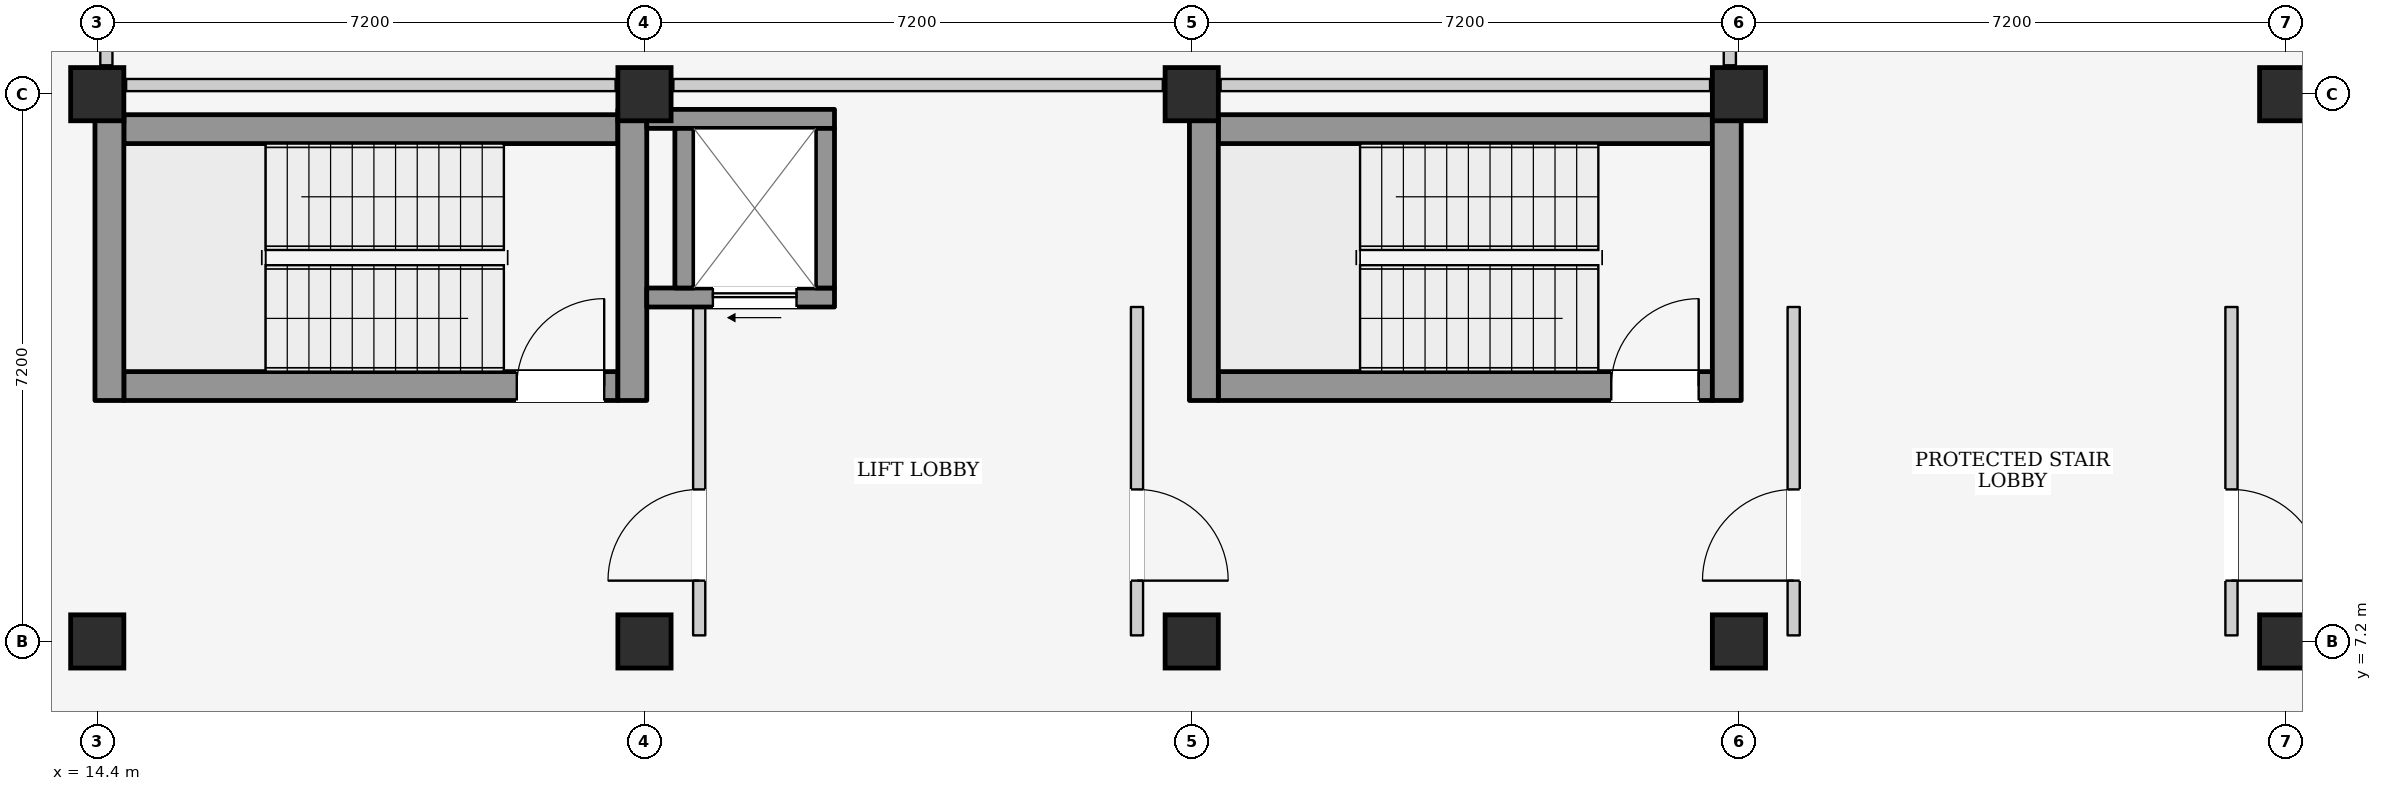
"""IFC4 building model, lengths in metres.
Left out: names, types, materials, properties, quantities, classifications, styles, units other than length and angle.
Written with IfcOpenShell. Run it as: python <this file> out.ifc"""

import sys

from ifc_helpers import new_model, si_unit, direction, frame, frame_2d, origin, origin_2d, place, context, subcontext, project, spatial, rectangle, extrude, element, fill, save


model = new_model("IFC4")
c1 = context("Model", 3, precision=1e-05, world=origin(), true_north=direction((0.0, 1.0)))
c2 = subcontext(c1, "Body", "Model", "MODEL_VIEW")
j1 = project(units=[si_unit("LENGTHUNIT", "METRE"), si_unit("PLANEANGLEUNIT", "RADIAN")], contexts=[c1])
p1 = place(None, origin())
s1 = spatial("IfcSite", under=j1, at=p1, CompositionType="ELEMENT")
p2 = place(p1, origin())
s2 = spatial("IfcBuilding", under=s1, at=p2, CompositionType="ELEMENT")
p3 = place(p2, frame((0.0, 0.0, -4.2)))
s3 = spatial("IfcBuildingStorey", under=s2, at=p3, CompositionType="ELEMENT", Elevation=-4.2)
for number, where, z_axis, x_axis in (
    (1, (14.4, 7.2, 0.0), (0.0, 0.0, 1.0), (1.0, 0.0, 0.0)),
    (2, (14.4, 14.4, 0.0), (0.0, 0.0, 1.0), (1.0, 0.0, 0.0)),
    (3, (21.6, 7.2, 0.0), (0.0, 0.0, 1.0), (1.0, 0.0, 0.0)),
    (4, (21.6, 14.4, 0.0), (0.0, 0.0, 1.0), (1.0, 0.0, 0.0)),
    (5, (28.8, 7.2, 0.0), (0.0, 0.0, 1.0), (1.0, 0.0, 0.0)),
    (6, (28.8, 14.4, 0.0), (0.0, 0.0, 1.0), (1.0, 0.0, 0.0)),
    (7, (36.0, 7.2, 0.0), (0.0, 0.0, 1.0), (1.0, 0.0, 0.0)),
    (8, (36.0, 14.4, 0.0), (0.0, 0.0, 1.0), (1.0, 0.0, 0.0)),
    (9, (43.2, 7.2, 0.0), (0.0, 0.0, 1.0), (1.0, 0.0, 0.0)),
    (10, (43.2, 14.4, 0.0), (0.0, 0.0, 1.0), (1.0, 0.0, 0.0)),
):
    element("IfcColumn", number, at=place(p3, frame(where, z_axis=z_axis, x_axis=x_axis)), inside=s3, PredefinedType="COLUMN", context=c2, shape_type="SweptSolid", body=[
        extrude(rectangle(XDim=0.7, YDim=0.7, at=origin_2d()), origin(), (0.0, 0.0, 1.0), 4.2),
    ])
p4 = place(p3, frame((14.75, 10.56, 0.0), z_axis=(0.0, 0.0, 1.0), x_axis=(1.0, 0.0, 0.0)))
e11 = element("IfcWall", 11, at=p4, inside=s3, PredefinedType="SHEAR", context=c2, shape_type="SweptSolid", body=[
    extrude(rectangle(XDim=6.5, YDim=0.38, at=frame_2d((3.25, 0.0))), origin(), (0.0, 0.0, 1.0), 3.79),
])
p5 = place(p4, frame((5.17, 0.0, 0.0)))
e12 = element("IfcOpeningElement", 12, at=p5, cuts=e11, PredefinedType="OPENING", context=c2, shape_type="SweptSolid", body=[
    extrude(rectangle(XDim=1.15, YDim=2.2, at=frame_2d((0.575, 1.1))), frame((0.0, 0.205, 0.0), z_axis=(0.0, -1.0, 0.0), x_axis=(1.0, 0.0, 0.0)), (0.0, 0.0, 1.0), 0.41),
])
p6 = place(p3, frame((14.75, 13.94, 0.0), z_axis=(0.0, 0.0, 1.0), x_axis=(1.0, 0.0, 0.0)))
e13 = element("IfcWall", 13, at=p6, inside=s3, PredefinedType="SHEAR", context=c2, shape_type="SweptSolid", body=[
    extrude(rectangle(XDim=6.5, YDim=0.38, at=frame_2d((3.25, 0.0))), origin(), (0.0, 0.0, 1.0), 3.79),
])
p7 = place(p3, frame((14.56, 10.37, 0.0), z_axis=(0.0, 0.0, 1.0), x_axis=(0.0, 1.0, 0.0)))
e14 = element("IfcWall", 14, at=p7, inside=s3, PredefinedType="SHEAR", context=c2, shape_type="SweptSolid", body=[
    extrude(rectangle(XDim=3.76, YDim=0.38, at=frame_2d((1.88, 0.0))), origin(), (0.0, 0.0, 1.0), 3.79),
])
p8 = place(p3, frame((21.44, 10.37, 0.0), z_axis=(0.0, 0.0, 1.0), x_axis=(0.0, 1.0, 0.0)))
e15 = element("IfcWall", 15, at=p8, inside=s3, PredefinedType="SHEAR", context=c2, shape_type="SweptSolid", body=[
    extrude(rectangle(XDim=3.83, YDim=0.38, at=frame_2d((1.915, 0.0))), origin(), (0.0, 0.0, 1.0), 3.79),
])
p9 = place(p3, frame((22.32, 7.28, 0.0), z_axis=(0.0, 0.0, 1.0), x_axis=(0.0, 1.0, 0.0)))
e16 = element("IfcWall", 16, at=p9, inside=s3, PredefinedType="PARTITIONING", context=c2, shape_type="SweptSolid", body=[
    extrude(rectangle(XDim=4.32, YDim=0.16, at=frame_2d((2.16, 0.0))), origin(), (0.0, 0.0, 1.0), 3.79),
])
p10 = place(p9, frame((0.72, 0.0, 0.0)))
e17 = element("IfcOpeningElement", 17, at=p10, cuts=e16, PredefinedType="OPENING", context=c2, shape_type="SweptSolid", body=[
    extrude(rectangle(XDim=1.2, YDim=2.2, at=frame_2d((0.6, 1.1))), frame((0.0, 0.095, 0.0), z_axis=(0.0, -1.0, 0.0), x_axis=(1.0, 0.0, 0.0)), (0.0, 0.0, 1.0), 0.19),
])
p11 = place(p3, frame((28.08, 7.28, 0.0), z_axis=(0.0, 0.0, 1.0), x_axis=(0.0, 1.0, 0.0)))
e18 = element("IfcWall", 18, at=p11, inside=s3, PredefinedType="PARTITIONING", context=c2, shape_type="SweptSolid", body=[
    extrude(rectangle(XDim=4.32, YDim=0.16, at=frame_2d((2.16, 0.0))), origin(), (0.0, 0.0, 1.0), 3.79),
])
p12 = place(p11, frame((0.72, 0.0, 0.0)))
e19 = element("IfcOpeningElement", 19, at=p12, cuts=e18, PredefinedType="OPENING", context=c2, shape_type="SweptSolid", body=[
    extrude(rectangle(XDim=1.2, YDim=2.2, at=frame_2d((0.6, 1.1))), frame((0.0, 0.095, 0.0), z_axis=(0.0, -1.0, 0.0), x_axis=(1.0, 0.0, 0.0)), (0.0, 0.0, 1.0), 0.19),
])
p13 = place(p3, frame((21.63, 11.725, 0.0), z_axis=(0.0, 0.0, 1.0), x_axis=(1.0, 0.0, 0.0)))
e20 = element("IfcWall", 20, at=p13, inside=s3, PredefinedType="SHEAR", context=c2, shape_type="SweptSolid", body=[
    extrude(rectangle(XDim=2.47, YDim=0.25, at=frame_2d((1.235, 0.0))), origin(), (0.0, 0.0, 1.0), 3.79),
])
p14 = place(p13, frame((0.87, 0.0, 0.0)))
e21 = element("IfcOpeningElement", 21, at=p14, cuts=e20, PredefinedType="OPENING", context=c2, shape_type="SweptSolid", body=[
    extrude(rectangle(XDim=1.1, YDim=2.15, at=frame_2d((0.55, 1.075))), frame((0.0, 0.14, 0.0), z_axis=(0.0, -1.0, 0.0), x_axis=(1.0, 0.0, 0.0)), (0.0, 0.0, 1.0), 0.28),
])
p15 = place(p3, frame((21.63, 14.075, 0.0), z_axis=(0.0, 0.0, 1.0), x_axis=(1.0, 0.0, 0.0)))
e22 = element("IfcWall", 22, at=p15, inside=s3, PredefinedType="SHEAR", context=c2, shape_type="SweptSolid", body=[
    extrude(rectangle(XDim=2.47, YDim=0.25, at=frame_2d((1.235, 0.0))), origin(), (0.0, 0.0, 1.0), 3.79),
])
for number, where, z_axis, x_axis in (
    (23, (22.125, 11.85, 0.0), (0.0, 0.0, 1.0), (0.0, 1.0, 0.0)),
    (24, (23.975, 11.85, 0.0), (0.0, 0.0, 1.0), (0.0, 1.0, 0.0)),
):
    element("IfcWall", number, at=place(p3, frame(where, z_axis=z_axis, x_axis=x_axis)), inside=s3, PredefinedType="SHEAR", context=c2, shape_type="SweptSolid", body=[
        extrude(rectangle(XDim=2.1, YDim=0.25, at=frame_2d((1.05, 0.0))), origin(), (0.0, 0.0, 1.0), 3.79),
    ])
p16 = place(p3, frame((29.15, 10.56, 0.0), z_axis=(0.0, 0.0, 1.0), x_axis=(1.0, 0.0, 0.0)))
e25 = element("IfcWall", 25, at=p16, inside=s3, PredefinedType="SHEAR", context=c2, shape_type="SweptSolid", body=[
    extrude(rectangle(XDim=6.5, YDim=0.38, at=frame_2d((3.25, 0.0))), origin(), (0.0, 0.0, 1.0), 3.79),
])
p17 = place(p16, frame((5.17, 0.0, 0.0)))
e26 = element("IfcOpeningElement", 26, at=p17, cuts=e25, PredefinedType="OPENING", context=c2, shape_type="SweptSolid", body=[
    extrude(rectangle(XDim=1.15, YDim=2.2, at=frame_2d((0.575, 1.1))), frame((0.0, 0.205, 0.0), z_axis=(0.0, -1.0, 0.0), x_axis=(1.0, 0.0, 0.0)), (0.0, 0.0, 1.0), 0.41),
])
p18 = place(p3, frame((29.15, 13.94, 0.0), z_axis=(0.0, 0.0, 1.0), x_axis=(1.0, 0.0, 0.0)))
e27 = element("IfcWall", 27, at=p18, inside=s3, PredefinedType="SHEAR", context=c2, shape_type="SweptSolid", body=[
    extrude(rectangle(XDim=6.5, YDim=0.38, at=frame_2d((3.25, 0.0))), origin(), (0.0, 0.0, 1.0), 3.79),
])
for number, where, z_axis, x_axis in (
    (28, (28.96, 10.37, 0.0), (0.0, 0.0, 1.0), (0.0, 1.0, 0.0)),
    (29, (35.84, 10.37, 0.0), (0.0, 0.0, 1.0), (0.0, 1.0, 0.0)),
):
    element("IfcWall", number, at=place(p3, frame(where, z_axis=z_axis, x_axis=x_axis)), inside=s3, PredefinedType="SHEAR", context=c2, shape_type="SweptSolid", body=[
        extrude(rectangle(XDim=3.76, YDim=0.38, at=frame_2d((1.88, 0.0))), origin(), (0.0, 0.0, 1.0), 3.79),
    ])
p19 = place(p3, frame((36.72, 7.28, 0.0), z_axis=(0.0, 0.0, 1.0), x_axis=(0.0, 1.0, 0.0)))
e30 = element("IfcWall", 30, at=p19, inside=s3, PredefinedType="PARTITIONING", context=c2, shape_type="SweptSolid", body=[
    extrude(rectangle(XDim=4.32, YDim=0.16, at=frame_2d((2.16, 0.0))), origin(), (0.0, 0.0, 1.0), 3.79),
])
p20 = place(p19, frame((0.72, 0.0, 0.0)))
e31 = element("IfcOpeningElement", 31, at=p20, cuts=e30, PredefinedType="OPENING", context=c2, shape_type="SweptSolid", body=[
    extrude(rectangle(XDim=1.2, YDim=2.2, at=frame_2d((0.6, 1.1))), frame((0.0, 0.095, 0.0), z_axis=(0.0, -1.0, 0.0), x_axis=(1.0, 0.0, 0.0)), (0.0, 0.0, 1.0), 0.19),
])
p21 = place(p3, frame((42.48, 7.28, 0.0), z_axis=(0.0, 0.0, 1.0), x_axis=(0.0, 1.0, 0.0)))
e32 = element("IfcWall", 32, at=p21, inside=s3, PredefinedType="PARTITIONING", context=c2, shape_type="SweptSolid", body=[
    extrude(rectangle(XDim=4.32, YDim=0.16, at=frame_2d((2.16, 0.0))), origin(), (0.0, 0.0, 1.0), 3.79),
])
p22 = place(p21, frame((0.72, 0.0, 0.0)))
e33 = element("IfcOpeningElement", 33, at=p22, cuts=e32, PredefinedType="OPENING", context=c2, shape_type="SweptSolid", body=[
    extrude(rectangle(XDim=1.2, YDim=2.2, at=frame_2d((0.6, 1.1))), frame((0.0, 0.095, 0.0), z_axis=(0.0, -1.0, 0.0), x_axis=(1.0, 0.0, 0.0)), (0.0, 0.0, 1.0), 0.19),
])
for number, where, z_axis, x_axis in (
    (34, (14.78, 14.52, 0.0), (0.0, 0.0, 1.0), (1.0, 0.0, 0.0)),
    (35, (21.98, 14.52, 0.0), (0.0, 0.0, 1.0), (1.0, 0.0, 0.0)),
):
    element("IfcWall", number, at=place(p3, frame(where, z_axis=z_axis, x_axis=x_axis)), inside=s3, PredefinedType="PARTITIONING", context=c2, shape_type="SweptSolid", body=[
        extrude(rectangle(XDim=6.44, YDim=0.16, at=frame_2d((3.22, 0.0))), origin(), (0.0, 0.0, 1.0), 3.025),
    ])
p23 = place(p3, frame((29.18, 14.52, 0.0), z_axis=(0.0, 0.0, 1.0), x_axis=(1.0, 0.0, 0.0)))
e36 = element("IfcWall", 36, at=p23, inside=s3, PredefinedType="PARTITIONING", context=c2, shape_type="SweptSolid", body=[
    extrude(rectangle(XDim=6.44, YDim=0.16, at=frame_2d((3.22, 0.0))), origin(), (0.0, 0.0, 1.0), 3.025),
])
p24 = place(p3, frame((14.52, 14.78, 0.0), z_axis=(0.0, 0.0, 1.0), x_axis=(0.0, 1.0, 0.0)))
e37 = element("IfcWall", 37, at=p24, inside=s3, PredefinedType="PARTITIONING", context=c2, shape_type="SweptSolid", body=[
    extrude(rectangle(XDim=6.44, YDim=0.16, at=frame_2d((3.22, 0.0))), origin(), (0.0, 0.0, 1.0), 3.025),
])
p25 = place(p3, frame((35.88, 14.78, 0.0), z_axis=(0.0, 0.0, 1.0), x_axis=(0.0, 1.0, 0.0)))
e38 = element("IfcWall", 38, at=p25, inside=s3, PredefinedType="PARTITIONING", context=c2, shape_type="SweptSolid", body=[
    extrude(rectangle(XDim=20.92, YDim=0.16, at=frame_2d((10.46, 0.0))), origin(), (0.0, 0.0, 1.0), 3.79),
])
p26 = place(p25, frame((2.745, 0.0, 0.0)))
e39 = element("IfcOpeningElement", 39, at=p26, cuts=e38, PredefinedType="OPENING", context=c2, shape_type="SweptSolid", body=[
    extrude(rectangle(XDim=0.95, YDim=2.1, at=frame_2d((0.475, 1.05))), frame((0.0, 0.095, 0.0), z_axis=(0.0, -1.0, 0.0), x_axis=(1.0, 0.0, 0.0)), (0.0, 0.0, 1.0), 0.19),
])
p27 = place(p5, origin())
e40 = element("IfcDoor", 40, at=p27, inside=s3, OperationType="SINGLE_SWING_RIGHT", PredefinedType="DOOR", context=c2, shape_type="SweptSolid", body=[
    extrude(rectangle(XDim=1.15, YDim=2.2, at=frame_2d((0.575, 1.1))), frame((0.0, 0.025, 0.0), z_axis=(0.0, -1.0, 0.0), x_axis=(1.0, 0.0, 0.0)), (0.0, 0.0, 1.0), 0.05),
])
fill(e12, e40)
p28 = place(p10, origin())
e41 = element("IfcDoor", 41, at=p28, inside=s3, OperationType="SINGLE_SWING_LEFT", PredefinedType="DOOR", context=c2, shape_type="SweptSolid", body=[
    extrude(rectangle(XDim=1.2, YDim=2.2, at=frame_2d((0.6, 1.1))), frame((0.0, 0.025, 0.0), z_axis=(0.0, -1.0, 0.0), x_axis=(1.0, 0.0, 0.0)), (0.0, 0.0, 1.0), 0.05),
])
fill(e17, e41)
p29 = place(p12, frame((1.2, 0.0, 0.0), z_axis=(0.0, 0.0, 1.0), x_axis=(-1.0, 0.0, 0.0)))
e42 = element("IfcDoor", 42, at=p29, inside=s3, OperationType="SINGLE_SWING_RIGHT", PredefinedType="DOOR", context=c2, shape_type="SweptSolid", body=[
    extrude(rectangle(XDim=1.2, YDim=2.2, at=frame_2d((0.6, 1.1))), frame((0.0, 0.025, 0.0), z_axis=(0.0, -1.0, 0.0), x_axis=(1.0, 0.0, 0.0)), (0.0, 0.0, 1.0), 0.05),
])
fill(e19, e42)
p30 = place(p14, frame((1.1, 0.0, 0.0), z_axis=(0.0, 0.0, 1.0), x_axis=(-1.0, 0.0, 0.0)))
e43 = element("IfcDoor", 43, at=p30, inside=s3, OperationType="SLIDING_TO_LEFT", PredefinedType="DOOR", context=c2, shape_type="SweptSolid", body=[
    extrude(rectangle(XDim=1.1, YDim=2.15, at=frame_2d((0.55, 1.075))), frame((0.0, 0.025, 0.0), z_axis=(0.0, -1.0, 0.0), x_axis=(1.0, 0.0, 0.0)), (0.0, 0.0, 1.0), 0.05),
])
fill(e21, e43)
p31 = place(p17, origin())
e44 = element("IfcDoor", 44, at=p31, inside=s3, OperationType="SINGLE_SWING_RIGHT", PredefinedType="DOOR", context=c2, shape_type="SweptSolid", body=[
    extrude(rectangle(XDim=1.15, YDim=2.2, at=frame_2d((0.575, 1.1))), frame((0.0, 0.025, 0.0), z_axis=(0.0, -1.0, 0.0), x_axis=(1.0, 0.0, 0.0)), (0.0, 0.0, 1.0), 0.05),
])
fill(e26, e44)
p32 = place(p20, origin())
e45 = element("IfcDoor", 45, at=p32, inside=s3, OperationType="SINGLE_SWING_LEFT", PredefinedType="DOOR", context=c2, shape_type="SweptSolid", body=[
    extrude(rectangle(XDim=1.2, YDim=2.2, at=frame_2d((0.6, 1.1))), frame((0.0, 0.025, 0.0), z_axis=(0.0, -1.0, 0.0), x_axis=(1.0, 0.0, 0.0)), (0.0, 0.0, 1.0), 0.05),
])
fill(e31, e45)
p33 = place(p22, frame((1.2, 0.0, 0.0), z_axis=(0.0, 0.0, 1.0), x_axis=(-1.0, 0.0, 0.0)))
e46 = element("IfcDoor", 46, at=p33, inside=s3, OperationType="SINGLE_SWING_RIGHT", PredefinedType="DOOR", context=c2, shape_type="SweptSolid", body=[
    extrude(rectangle(XDim=1.2, YDim=2.2, at=frame_2d((0.6, 1.1))), frame((0.0, 0.025, 0.0), z_axis=(0.0, -1.0, 0.0), x_axis=(1.0, 0.0, 0.0)), (0.0, 0.0, 1.0), 0.05),
])
fill(e33, e46)
save(model, sys.argv[1])
